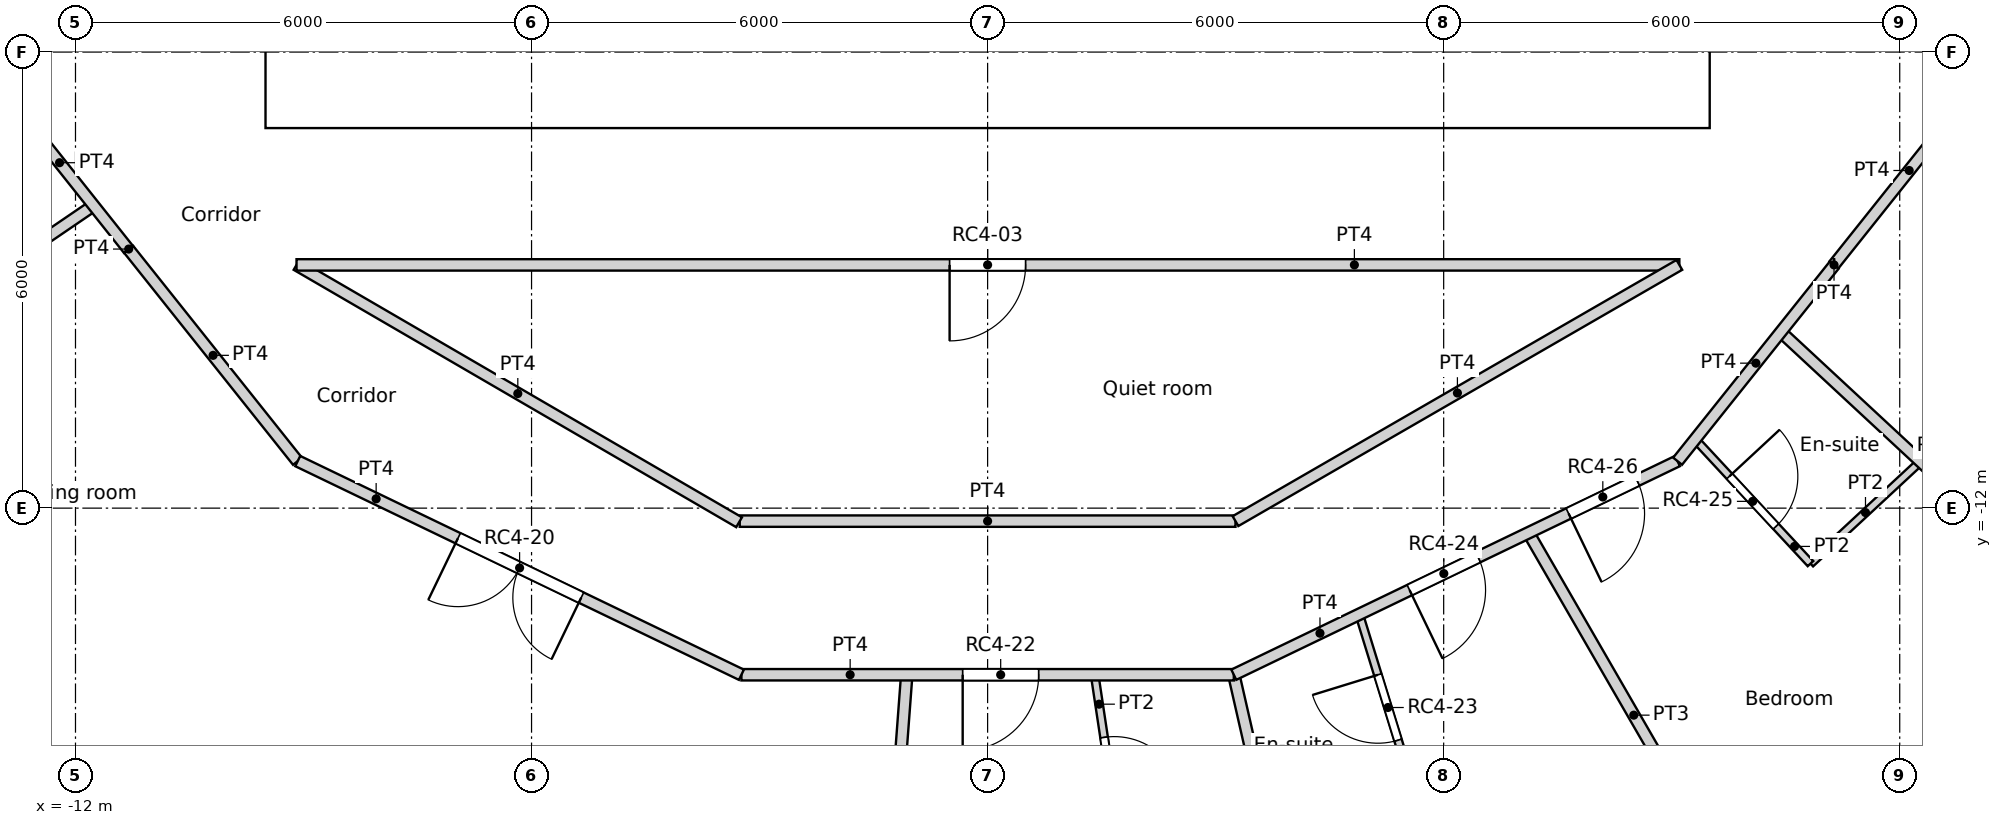
"""IFC4 building model, lengths in metres.
Left out: names, types, materials, properties, quantities, classifications, styles, units other than length and angle.
Written with IfcOpenShell. Run it as: python <this file> out.ifc"""

import sys

from ifc_helpers import new_model, si_unit, direction, frame, frame_2d, origin, origin_2d, place, context, subcontext, project, spatial, rectangle, circle, extrude, element, fill, save


model = new_model("IFC4")
c1 = context("Model", 3, precision=1e-05, world=origin(), true_north=direction((0.0, 1.0)))
c2 = subcontext(c1, "Body", "Model", "MODEL_VIEW")
j1 = project(units=[si_unit("LENGTHUNIT", "METRE"), si_unit("PLANEANGLEUNIT", "RADIAN")], contexts=[c1])
p1 = place(None, origin())
s1 = spatial("IfcSite", under=j1, at=p1, CompositionType="ELEMENT")
p2 = place(p1, origin())
s2 = spatial("IfcBuilding", under=s1, at=p2, CompositionType="ELEMENT")
p3 = place(p2, frame((0.0, 0.0, 263.4)))
s3 = spatial("IfcBuildingStorey", under=s2, at=p3, CompositionType="ELEMENT", Elevation=263.4)
p4 = place(p3, frame((11.735, -14.716, 0.0), z_axis=(0.0, 0.0, 1.0), x_axis=(1.0, 0.0, 0.0)))
e1 = element("IfcColumn", 1, at=p4, inside=s3, PredefinedType="COLUMN", context=c2, shape_type="SweptSolid", body=[
    extrude(circle(Radius=0.55, at=origin_2d()), origin(), (0.0, 0.0, 1.0), 3.6),
])
p5 = place(p3, frame((-9.5, -6.7, 0.0), z_axis=(0.0, 0.0, 1.0), x_axis=(1.0, 0.0, 0.0)))
e2 = element("IfcWall", 2, at=p5, inside=s3, PredefinedType="SOLIDWALL", context=c2, shape_type="SweptSolid", body=[
    extrude(rectangle(XDim=19.0, YDim=0.6, at=frame_2d((9.5, 0.0))), origin(), (0.0, 0.0, 1.0), 3.6),
])
p6 = place(p5, frame((10.4, 0.0, 0.0)))
e3 = element("IfcOpeningElement", 3, at=p6, cuts=e2, PredefinedType="OPENING", context=c2, shape_type="SweptSolid", body=[
    extrude(rectangle(XDim=1.0, YDim=2.1, at=frame_2d((0.5, 1.05))), frame((0.0, 0.3, 0.0), z_axis=(0.0, -1.0, 0.0), x_axis=(1.0, 0.0, 0.0)), (0.0, 0.0, 1.0), 0.6),
])
p7 = place(p5, frame((5.35, 0.0, 0.0)))
e4 = element("IfcOpeningElement", 4, at=p7, cuts=e2, PredefinedType="OPENING", context=c2, shape_type="SweptSolid", body=[
    extrude(rectangle(XDim=1.7, YDim=2.1, at=frame_2d((0.85, 1.05))), frame((0.0, 0.3, 0.0), z_axis=(0.0, -1.0, 0.0), x_axis=(1.0, 0.0, 0.0)), (0.0, 0.0, 1.0), 0.6),
])
p8 = place(p5, frame((11.95, 0.0, 0.0)))
e5 = element("IfcOpeningElement", 5, at=p8, cuts=e2, PredefinedType="OPENING", context=c2, shape_type="SweptSolid", body=[
    extrude(rectangle(XDim=1.7, YDim=2.1, at=frame_2d((0.85, 1.05))), frame((0.0, 0.3, 0.0), z_axis=(0.0, -1.0, 0.0), x_axis=(1.0, 0.0, 0.0)), (0.0, 0.0, 1.0), 0.6),
])
p9 = place(p3, frame((-9.2, -6.4, 0.0), z_axis=(0.0, 0.0, 1.0), x_axis=(0.0, 1.0, 0.0)))
e6 = element("IfcWall", 6, at=p9, inside=s3, PredefinedType="SOLIDWALL", context=c2, shape_type="SweptSolid", body=[
    extrude(rectangle(XDim=12.8, YDim=0.6, at=frame_2d((6.4, 0.0))), origin(), (0.0, 0.0, 1.0), 3.6),
])
p10 = place(p3, frame((9.2, -6.4, 0.0), z_axis=(0.0, 0.0, 1.0), x_axis=(0.0, 1.0, 0.0)))
e7 = element("IfcWall", 7, at=p10, inside=s3, PredefinedType="SOLIDWALL", context=c2, shape_type="SweptSolid", body=[
    extrude(rectangle(XDim=12.8, YDim=0.6, at=frame_2d((6.4, 0.0))), origin(), (0.0, 0.0, 1.0), 3.6),
])
p11 = place(p10, frame((6.4, 0.0, 0.0)))
e8 = element("IfcOpeningElement", 8, at=p11, cuts=e7, PredefinedType="OPENING", context=c2, shape_type="SweptSolid", body=[
    extrude(rectangle(XDim=1.8, YDim=2.1, at=frame_2d((0.9, 1.05))), frame((0.0, 0.3, 0.0), z_axis=(0.0, -1.0, 0.0), x_axis=(1.0, 0.0, 0.0)), (0.0, 0.0, 1.0), 0.6),
])
for number, where, z_axis, x_axis in (
    (9, (-2.25, -6.4, 0.0), (0.0, 0.0, 1.0), (0.0, 1.0, 0.0)),
    (10, (0.55, -6.4, 0.0), (0.0, 0.0, 1.0), (0.0, 1.0, 0.0)),
    (11, (2.25, -6.4, 0.0), (0.0, 0.0, 1.0), (0.0, 1.0, 0.0)),
):
    element("IfcWall", number, at=place(p3, frame(where, z_axis=z_axis, x_axis=x_axis)), inside=s3, PredefinedType="SOLIDWALL", context=c2, shape_type="SweptSolid", body=[
        extrude(rectangle(XDim=3.15, YDim=0.3, at=frame_2d((1.575, 0.0))), origin(), (0.0, 0.0, 1.0), 3.25),
    ])
p12 = place(p3, frame((-9.092, -8.8, 0.0), z_axis=(0.0, 0.0, 1.0), x_axis=(1.0, 0.0, 0.0)))
e12 = element("IfcWall", 12, at=p12, inside=s3, PredefinedType="PARTITIONING", context=c2, shape_type="SweptSolid", body=[
    extrude(rectangle(XDim=18.193, YDim=0.15, at=frame_2d((9.096, 0.0))), origin(), (0.0, 0.0, 1.0), 3.25),
])
p13 = place(p12, frame((8.592, 0.0, 0.0)))
e13 = element("IfcOpeningElement", 13, at=p13, cuts=e12, PredefinedType="OPENING", context=c2, shape_type="SweptSolid", body=[
    extrude(rectangle(XDim=1.0, YDim=2.04, at=frame_2d((0.5, 1.02))), frame((0.0, 0.075, 0.0), z_axis=(0.0, -1.0, 0.0), x_axis=(1.0, 0.0, 0.0)), (0.0, 0.0, 1.0), 0.15),
])
p14 = place(p3, frame((-9.092, -8.8, 0.0), z_axis=(0.0, 0.0, 1.0), x_axis=(0.864470922103, -0.502682827277, 0.0)))
e14 = element("IfcWall", 14, at=p14, inside=s3, PredefinedType="PARTITIONING", context=c2, shape_type="SweptSolid", body=[
    extrude(rectangle(XDim=6.735, YDim=0.15, at=frame_2d((3.368, 0.0))), origin(), (0.0, 0.0, 1.0), 3.25),
])
p15 = place(p3, frame((-11.3, -8.596, 0.0), z_axis=(0.0, 0.0, 1.0), x_axis=(0.623165080354, -0.782090328944, 0.0)))
e15 = element("IfcWall", 15, at=p15, inside=s3, PredefinedType="PARTITIONING", context=c2, shape_type="SweptSolid", body=[
    extrude(rectangle(XDim=3.564, YDim=0.15, at=frame_2d((1.782, 0.0))), origin(), (0.0, 0.0, 1.0), 3.25),
])
p16 = place(p3, frame((-11.3, -8.596, 0.0), z_axis=(0.0, 0.0, 1.0), x_axis=(0.0, 1.0, 0.0)))
e16 = element("IfcWall", 16, at=p16, inside=s3, PredefinedType="PARTITIONING", context=c2, shape_type="SweptSolid", body=[
    extrude(rectangle(XDim=0.009, YDim=0.15, at=frame_2d((0.005, 0.0))), origin(), (0.0, 0.0, 1.0), 3.25),
])
p17 = place(p3, frame((9.078, -11.382, 0.0), z_axis=(0.0, 0.0, 1.0), x_axis=(0.624018330412, 0.781409702595, 0.0)))
e17 = element("IfcWall", 17, at=p17, inside=s3, PredefinedType="PARTITIONING", context=c2, shape_type="SweptSolid", body=[
    extrude(rectangle(XDim=3.301, YDim=0.15, at=frame_2d((1.65, 0.0))), origin(), (0.0, 0.0, 1.0), 3.25),
])
p18 = place(p3, frame((11.137, -8.8, 0.0), z_axis=(0.0, 0.0, 1.0), x_axis=(-1.0, 0.0, 0.0)))
e18 = element("IfcWall", 18, at=p18, inside=s3, PredefinedType="PARTITIONING", context=c2, shape_type="SweptSolid", body=[
    extrude(rectangle(XDim=0.003, YDim=0.15, at=frame_2d((0.001, 0.0))), origin(), (0.0, 0.0, 1.0), 3.25),
])
p19 = place(p3, frame((11.134, -8.8, 0.0), z_axis=(0.0, 0.0, 1.0), x_axis=(0.623476099415, 0.781842409606, 0.0)))
e19 = element("IfcWall", 19, at=p19, inside=s3, PredefinedType="PARTITIONING", context=c2, shape_type="SweptSolid", body=[
    extrude(rectangle(XDim=3.177, YDim=0.15, at=frame_2d((1.589, 0.0))), origin(), (0.0, 0.0, 1.0), 3.25),
])
p20 = place(p3, frame((-13.115, -6.316, 0.0), z_axis=(0.0, 0.0, 1.0), x_axis=(0.622042479172, -0.782983495423, 0.0)))
e20 = element("IfcWall", 20, at=p20, inside=s3, PredefinedType="PARTITIONING", context=c2, shape_type="SweptSolid", body=[
    extrude(rectangle(XDim=2.911, YDim=0.15, at=frame_2d((1.456, 0.0))), origin(), (0.0, 0.0, 1.0), 3.25),
])
p21 = place(p3, frame((-3.261, -12.171, 0.0), z_axis=(0.0, 0.0, 1.0), x_axis=(1.0, 0.0, 0.0)))
e21 = element("IfcWall", 21, at=p21, inside=s3, PredefinedType="PARTITIONING", context=c2, shape_type="SweptSolid", body=[
    extrude(rectangle(XDim=6.522, YDim=0.15, at=frame_2d((3.261, 0.0))), origin(), (0.0, 0.0, 1.0), 3.25),
])
p22 = place(p3, frame((3.261, -12.171, 0.0), z_axis=(0.0, 0.0, 1.0), x_axis=(0.866066809554, 0.499928276245, 0.0)))
e22 = element("IfcWall", 22, at=p22, inside=s3, PredefinedType="PARTITIONING", context=c2, shape_type="SweptSolid", body=[
    extrude(rectangle(XDim=6.743, YDim=0.15, at=frame_2d((3.371, 0.0))), origin(), (0.0, 0.0, 1.0), 3.25),
])
p23 = place(p3, frame((-3.239, -14.192, 0.0), z_axis=(0.0, 0.0, 1.0), x_axis=(1.0, 0.0, 0.0)))
e23 = element("IfcWall", 23, at=p23, inside=s3, PredefinedType="PARTITIONING", context=c2, shape_type="SweptSolid", body=[
    extrude(rectangle(XDim=6.478, YDim=0.15, at=frame_2d((3.239, 0.0))), origin(), (0.0, 0.0, 1.0), 3.25),
])
p24 = place(p23, frame((2.911, 0.0, 0.0)))
e24 = element("IfcOpeningElement", 24, at=p24, cuts=e23, PredefinedType="OPENING", context=c2, shape_type="SweptSolid", body=[
    extrude(rectangle(XDim=1.0, YDim=2.1, at=frame_2d((0.5, 1.05))), frame((0.0, 0.075, 0.0), z_axis=(0.0, -1.0, 0.0), x_axis=(1.0, 0.0, 0.0)), (0.0, 0.0, 1.0), 0.15),
])
p25 = place(p3, frame((-9.076, -11.381, 0.0), z_axis=(0.0, 0.0, 1.0), x_axis=(0.900976027191, -0.433868872388, 0.0)))
e25 = element("IfcWall", 25, at=p25, inside=s3, PredefinedType="PARTITIONING", context=c2, shape_type="SweptSolid", body=[
    extrude(rectangle(XDim=6.479, YDim=0.15, at=frame_2d((3.239, 0.0))), origin(), (0.0, 0.0, 1.0), 3.25),
])
p26 = place(p25, frame((2.34, 0.0, 0.0)))
e26 = element("IfcOpeningElement", 26, at=p26, cuts=e25, PredefinedType="OPENING", context=c2, shape_type="SweptSolid", body=[
    extrude(rectangle(XDim=1.8, YDim=2.1, at=frame_2d((0.9, 1.05))), frame((0.0, 0.075, 0.0), z_axis=(0.0, -1.0, 0.0), x_axis=(1.0, 0.0, 0.0)), (0.0, 0.0, 1.0), 0.15),
])
p27 = place(p3, frame((3.239, -14.192, 0.0), z_axis=(0.0, 0.0, 1.0), x_axis=(0.900939467372, 0.433944784657, 0.0)))
e27 = element("IfcWall", 27, at=p27, inside=s3, PredefinedType="PARTITIONING", context=c2, shape_type="SweptSolid", body=[
    extrude(rectangle(XDim=6.479, YDim=0.15, at=frame_2d((3.239, 0.0))), origin(), (0.0, 0.0, 1.0), 3.25),
])
p28 = place(p27, frame((2.567, 0.0, 0.0)))
e28 = element("IfcOpeningElement", 28, at=p28, cuts=e27, PredefinedType="OPENING", context=c2, shape_type="SweptSolid", body=[
    extrude(rectangle(XDim=1.0, YDim=2.1, at=frame_2d((0.5, 1.05))), frame((0.0, 0.075, 0.0), z_axis=(0.0, -1.0, 0.0), x_axis=(1.0, 0.0, 0.0)), (0.0, 0.0, 1.0), 0.15),
])
p29 = place(p27, frame((4.889, 0.0, 0.0)))
e29 = element("IfcOpeningElement", 29, at=p29, cuts=e27, PredefinedType="OPENING", context=c2, shape_type="SweptSolid", body=[
    extrude(rectangle(XDim=1.0, YDim=2.1, at=frame_2d((0.5, 1.05))), frame((0.0, 0.075, 0.0), z_axis=(0.0, -1.0, 0.0), x_axis=(1.0, 0.0, 0.0)), (0.0, 0.0, 1.0), 0.15),
])
p30 = place(p3, frame((-16.336, -11.138, 0.0), z_axis=(0.0, 0.0, 1.0), x_axis=(0.82615274451, 0.563446219917, 0.0)))
e30 = element("IfcWall", 30, at=p30, inside=s3, PredefinedType="PARTITIONING", context=c2, shape_type="SweptSolid", body=[
    extrude(rectangle(XDim=5.54, YDim=0.15, at=frame_2d((2.77, 0.0))), origin(), (0.0, 0.0, 1.0), 3.25),
])
p31 = place(p3, frame((-1.478, -19.716, 0.0), z_axis=(0.0, 0.0, 1.0), x_axis=(0.074745027699, 0.997202677912, 0.0)))
e31 = element("IfcWall", 31, at=p31, inside=s3, PredefinedType="PARTITIONING", context=c2, shape_type="SweptSolid", body=[
    extrude(rectangle(XDim=5.54, YDim=0.15, at=frame_2d((2.77, 0.0))), origin(), (0.0, 0.0, 1.0), 3.25),
])
p32 = place(p3, frame((1.408, -14.192, 0.0), z_axis=(0.0, 0.0, 1.0), x_axis=(0.149289553133, -0.988793522089, 0.0)))
e32 = element("IfcWall", 32, at=p32, inside=s3, PredefinedType="PARTITIONING", context=c2, shape_type="SweptSolid", body=[
    extrude(rectangle(XDim=2.566, YDim=0.1, at=frame_2d((1.283, 0.0))), origin(), (0.0, 0.0, 1.0), 3.25),
])
p33 = place(p32, frame((0.833, 0.0, 0.0)))
e33 = element("IfcOpeningElement", 33, at=p33, cuts=e32, PredefinedType="OPENING", context=c2, shape_type="SweptSolid", body=[
    extrude(rectangle(XDim=0.9, YDim=2.04, at=frame_2d((0.45, 1.02))), frame((0.0, 0.05, 0.0), z_axis=(0.0, -1.0, 0.0), x_axis=(1.0, 0.0, 0.0)), (0.0, 0.0, 1.0), 0.1),
])
p34 = place(p3, frame((3.239, -14.192, 0.0), z_axis=(0.0, 0.0, 1.0), x_axis=(0.222612505682, -0.974907007008, 0.0)))
e34 = element("IfcWall", 34, at=p34, inside=s3, PredefinedType="PARTITIONING", context=c2, shape_type="SweptSolid", body=[
    extrude(rectangle(XDim=5.215, YDim=0.15, at=frame_2d((2.607, 0.0))), origin(), (0.0, 0.0, 1.0), 3.25),
])
p35 = place(p3, frame((4.889, -13.397, 0.0), z_axis=(0.0, 0.0, 1.0), x_axis=(0.294654076104, -0.955603984627, 0.0)))
e35 = element("IfcWall", 35, at=p35, inside=s3, PredefinedType="PARTITIONING", context=c2, shape_type="SweptSolid", body=[
    extrude(rectangle(XDim=2.566, YDim=0.1, at=frame_2d((1.283, 0.0))), origin(), (0.0, 0.0, 1.0), 3.25),
])
p36 = place(p35, frame((0.833, 0.0, 0.0)))
e36 = element("IfcOpeningElement", 36, at=p36, cuts=e35, PredefinedType="OPENING", context=c2, shape_type="SweptSolid", body=[
    extrude(rectangle(XDim=0.9, YDim=2.04, at=frame_2d((0.45, 1.02))), frame((0.0, 0.05, 0.0), z_axis=(0.0, -1.0, 0.0), x_axis=(1.0, 0.0, 0.0)), (0.0, 0.0, 1.0), 0.1),
])
p37 = place(p3, frame((7.116, -12.325, 0.0), z_axis=(0.0, 0.0, 1.0), x_axis=(0.500054359786, -0.865994016873, 0.0)))
e37 = element("IfcWall", 37, at=p37, inside=s3, PredefinedType="PARTITIONING", context=c2, shape_type="SweptSolid", body=[
    extrude(rectangle(XDim=5.54, YDim=0.15, at=frame_2d((2.77, 0.0))), origin(), (0.0, 0.0, 1.0), 3.25),
])
p38 = place(p3, frame((9.306, -11.092, 0.0), z_axis=(0.0, 0.0, 1.0), x_axis=(0.680228963773, -0.732999697711, 0.0)))
e38 = element("IfcWall", 38, at=p38, inside=s3, PredefinedType="PARTITIONING", context=c2, shape_type="SweptSolid", body=[
    extrude(rectangle(XDim=2.235, YDim=0.1, at=frame_2d((1.117, 0.0))), origin(), (0.0, 0.0, 1.0), 3.25),
])
p39 = place(p38, frame((0.667, 0.0, 0.0)))
e39 = element("IfcOpeningElement", 39, at=p39, cuts=e38, PredefinedType="OPENING", context=c2, shape_type="SweptSolid", body=[
    extrude(rectangle(XDim=0.9, YDim=2.04, at=frame_2d((0.45, 1.02))), frame((0.0, 0.05, 0.0), z_axis=(0.0, -1.0, 0.0), x_axis=(1.0, 0.0, 0.0)), (0.0, 0.0, 1.0), 0.1),
])
p40 = place(p3, frame((10.826, -12.73, 0.0), z_axis=(0.0, 0.0, 1.0), x_axis=(0.732956436026, 0.680275578636, 0.0)))
e40 = element("IfcWall", 40, at=p40, inside=s3, PredefinedType="PARTITIONING", context=c2, shape_type="SweptSolid", body=[
    extrude(rectangle(XDim=1.974, YDim=0.1, at=frame_2d((0.987, 0.0))), origin(), (0.0, 0.0, 1.0), 3.25),
])
p41 = place(p3, frame((10.434, -9.679, 0.0), z_axis=(0.0, 0.0, 1.0), x_axis=(0.732845293448, -0.680395308531, 0.0)))
e41 = element("IfcWall", 41, at=p41, inside=s3, PredefinedType="PARTITIONING", context=c2, shape_type="SweptSolid", body=[
    extrude(rectangle(XDim=5.539, YDim=0.15, at=frame_2d((2.77, 0.0))), origin(), (0.0, 0.0, 1.0), 3.25),
])
p42 = place(p6, origin())
e42 = element("IfcDoor", 42, at=p42, inside=s3, OperationType="SINGLE_SWING_LEFT", PredefinedType="DOOR", context=c2, shape_type="SweptSolid", body=[
    extrude(rectangle(XDim=1.0, YDim=2.1, at=frame_2d((0.5, 1.05))), frame((0.0, 0.025, 0.0), z_axis=(0.0, -1.0, 0.0), x_axis=(1.0, 0.0, 0.0)), (0.0, 0.0, 1.0), 0.05),
])
fill(e3, e42)
p43 = place(p7, origin())
e43 = element("IfcDoor", 43, at=p43, inside=s3, OperationType="DOUBLE_DOOR_SINGLE_SWING", PredefinedType="DOOR", context=c2, shape_type="SweptSolid", body=[
    extrude(rectangle(XDim=1.7, YDim=2.1, at=frame_2d((0.85, 1.05))), frame((0.0, 0.025, 0.0), z_axis=(0.0, -1.0, 0.0), x_axis=(1.0, 0.0, 0.0)), (0.0, 0.0, 1.0), 0.05),
])
fill(e4, e43)
p44 = place(p8, origin())
e44 = element("IfcDoor", 44, at=p44, inside=s3, OperationType="DOUBLE_DOOR_SINGLE_SWING", PredefinedType="DOOR", context=c2, shape_type="SweptSolid", body=[
    extrude(rectangle(XDim=1.7, YDim=2.1, at=frame_2d((0.85, 1.05))), frame((0.0, 0.025, 0.0), z_axis=(0.0, -1.0, 0.0), x_axis=(1.0, 0.0, 0.0)), (0.0, 0.0, 1.0), 0.05),
])
fill(e5, e44)
p45 = place(p13, origin())
e45 = element("IfcDoor", 45, at=p45, inside=s3, OperationType="SINGLE_SWING_RIGHT", PredefinedType="DOOR", context=c2, shape_type="SweptSolid", body=[
    extrude(rectangle(XDim=1.0, YDim=2.04, at=frame_2d((0.5, 1.02))), frame((0.0, 0.025, 0.0), z_axis=(0.0, -1.0, 0.0), x_axis=(1.0, 0.0, 0.0)), (0.0, 0.0, 1.0), 0.05),
])
fill(e13, e45)
p46 = place(p26, origin())
e46 = element("IfcDoor", 46, at=p46, inside=s3, OperationType="DOUBLE_DOOR_SINGLE_SWING", PredefinedType="DOOR", context=c2, shape_type="SweptSolid", body=[
    extrude(rectangle(XDim=1.8, YDim=2.1, at=frame_2d((0.9, 1.05))), frame((0.0, 0.025, 0.0), z_axis=(0.0, -1.0, 0.0), x_axis=(1.0, 0.0, 0.0)), (0.0, 0.0, 1.0), 0.05),
])
fill(e26, e46)
p47 = place(p33, origin())
e47 = element("IfcDoor", 47, at=p47, inside=s3, OperationType="SINGLE_SWING_RIGHT", PredefinedType="DOOR", context=c2, shape_type="SweptSolid", body=[
    extrude(rectangle(XDim=0.9, YDim=2.04, at=frame_2d((0.45, 1.02))), frame((0.0, 0.025, 0.0), z_axis=(0.0, -1.0, 0.0), x_axis=(1.0, 0.0, 0.0)), (0.0, 0.0, 1.0), 0.05),
])
fill(e33, e47)
p48 = place(p24, origin())
e48 = element("IfcDoor", 48, at=p48, inside=s3, OperationType="SINGLE_SWING_RIGHT", PredefinedType="DOOR", context=c2, shape_type="SweptSolid", body=[
    extrude(rectangle(XDim=1.0, YDim=2.1, at=frame_2d((0.5, 1.05))), frame((0.0, 0.025, 0.0), z_axis=(0.0, -1.0, 0.0), x_axis=(1.0, 0.0, 0.0)), (0.0, 0.0, 1.0), 0.05),
])
fill(e24, e48)
p49 = place(p36, origin())
e49 = element("IfcDoor", 49, at=p49, inside=s3, OperationType="SINGLE_SWING_RIGHT", PredefinedType="DOOR", context=c2, shape_type="SweptSolid", body=[
    extrude(rectangle(XDim=0.9, YDim=2.04, at=frame_2d((0.45, 1.02))), frame((0.0, 0.025, 0.0), z_axis=(0.0, -1.0, 0.0), x_axis=(1.0, 0.0, 0.0)), (0.0, 0.0, 1.0), 0.05),
])
fill(e36, e49)
p50 = place(p28, origin())
e50 = element("IfcDoor", 50, at=p50, inside=s3, OperationType="SINGLE_SWING_RIGHT", PredefinedType="DOOR", context=c2, shape_type="SweptSolid", body=[
    extrude(rectangle(XDim=1.0, YDim=2.1, at=frame_2d((0.5, 1.05))), frame((0.0, 0.025, 0.0), z_axis=(0.0, -1.0, 0.0), x_axis=(1.0, 0.0, 0.0)), (0.0, 0.0, 1.0), 0.05),
])
fill(e28, e50)
p51 = place(p39, origin())
e51 = element("IfcDoor", 51, at=p51, inside=s3, OperationType="SINGLE_SWING_LEFT", PredefinedType="DOOR", context=c2, shape_type="SweptSolid", body=[
    extrude(rectangle(XDim=0.9, YDim=2.04, at=frame_2d((0.45, 1.02))), frame((0.0, 0.025, 0.0), z_axis=(0.0, -1.0, 0.0), x_axis=(1.0, 0.0, 0.0)), (0.0, 0.0, 1.0), 0.05),
])
fill(e39, e51)
p52 = place(p29, origin())
e52 = element("IfcDoor", 52, at=p52, inside=s3, OperationType="SINGLE_SWING_RIGHT", PredefinedType="DOOR", context=c2, shape_type="SweptSolid", body=[
    extrude(rectangle(XDim=1.0, YDim=2.1, at=frame_2d((0.5, 1.05))), frame((0.0, 0.025, 0.0), z_axis=(0.0, -1.0, 0.0), x_axis=(1.0, 0.0, 0.0)), (0.0, 0.0, 1.0), 0.05),
])
fill(e29, e52)
save(model, sys.argv[1])
